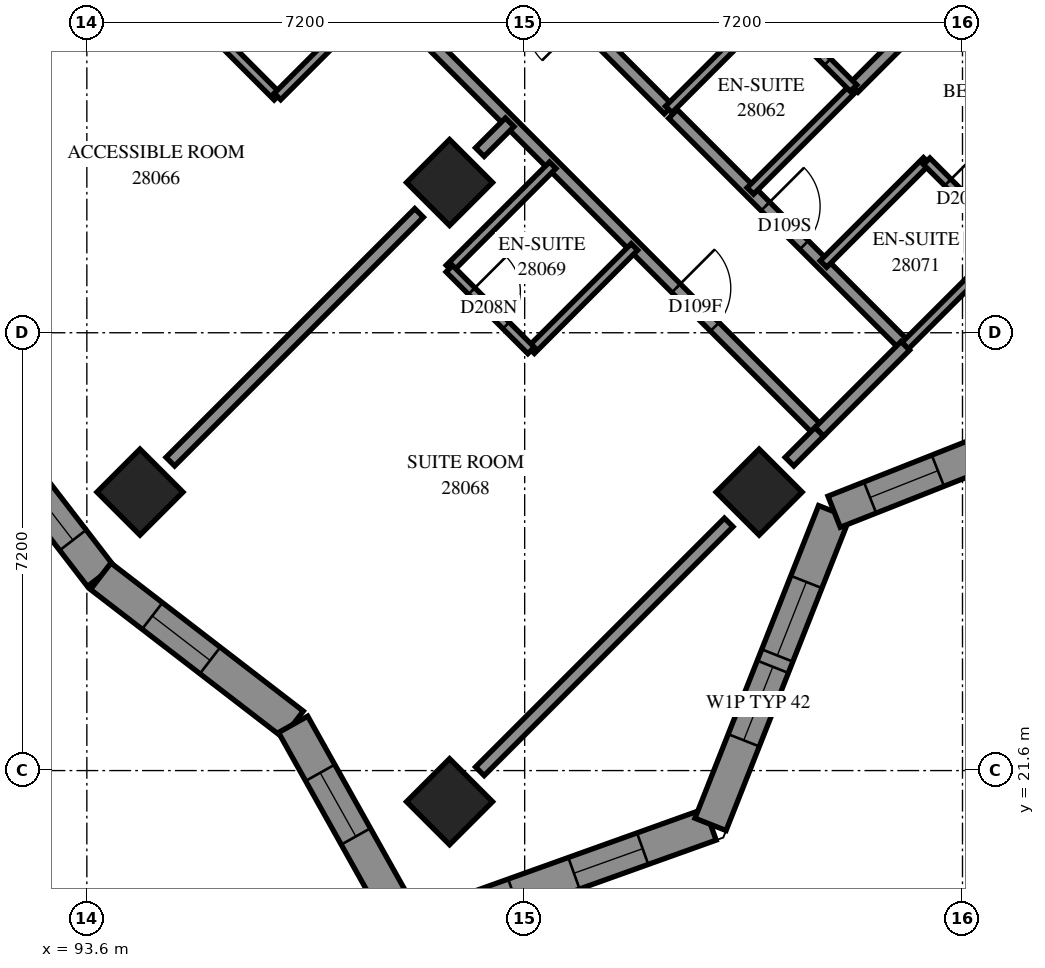
"""IFC4 building model, lengths in metres.
Left out: names, types, materials, properties, quantities, classifications, styles, units other than length and angle.
Written with IfcOpenShell. Run it as: python <this file> out.ifc"""

import sys

from ifc_helpers import new_model, si_unit, direction, frame, frame_2d, origin, origin_2d, place, context, subcontext, project, spatial, polyline, rectangle, outline, extrude, element, fill, save


model = new_model("IFC4")
c1 = context("Model", 3, precision=1e-05, world=origin(), true_north=direction((0.0, 1.0)))
c2 = subcontext(c1, "Body", "Model", "MODEL_VIEW")
j1 = project(units=[si_unit("LENGTHUNIT", "METRE"), si_unit("PLANEANGLEUNIT", "RADIAN")], contexts=[c1])
p1 = place(None, origin())
s1 = spatial("IfcSite", under=j1, at=p1, CompositionType="ELEMENT")
p2 = place(p1, origin())
s2 = spatial("IfcBuilding", under=s1, at=p2, CompositionType="ELEMENT")
p3 = place(p2, frame((0.0, 0.0, 105.0)))
s3 = spatial("IfcBuildingStorey", under=s2, at=p3, CompositionType="ELEMENT", Elevation=105.0)
for number, where, z_axis, x_axis in (
    (1, (99.565, 31.271, 0.0), (0.0, 0.0, 1.0), (0.707, -0.707, 0.0)),
    (2, (94.474, 26.18, 0.0), (0.0, 0.0, 1.0), (0.707, -0.707, 0.0)),
    (3, (104.656, 26.18, 0.0), (0.0, 0.0, 1.0), (0.707, -0.707, 0.0)),
    (4, (99.565, 21.088, 0.0), (0.0, 0.0, 1.0), (0.707, -0.707, 0.0)),
):
    element("IfcColumn", number, at=place(p3, frame(where, z_axis=z_axis, x_axis=x_axis)), inside=s3, PredefinedType="COLUMN", context=c2, shape_type="SweptSolid", body=[
        extrude(rectangle(XDim=1.0, YDim=1.0, at=origin_2d()), origin(), (0.0, 0.0, 1.0), 3.1),
    ])
p4 = place(p3, frame((98.905, 18.942, 0.0), z_axis=(0.0, 0.0, 1.0), x_axis=(0.941452059, 0.337146883, 0.0)))
e5 = element("IfcWall", 5, at=p4, inside=s3, PredefinedType="SOLIDWALL", context=c2, shape_type="SweptSolid", body=[
    extrude(outline(polyline([(-0.233, -0.275), (5.384, -0.275), (5.135, 0.275), (0.233, 0.275), (-0.233, -0.275)])), origin(), (0.0, 0.0, 1.0), 3.1),
])
p5 = place(p4, frame((0.623, 0.0, 0.5)))
e6 = element("IfcOpeningElement", 6, at=p5, cuts=e5, PredefinedType="OPENING", context=c2, shape_type="SweptSolid", body=[
    extrude(rectangle(XDim=1.2, YDim=2.45, at=frame_2d((0.6, 1.225))), frame((0.0, 0.285, 0.0), z_axis=(0.0, -1.0, 0.0), x_axis=(1.0, 0.0, 0.0)), (0.0, 0.0, 1.0), 0.57),
])
p6 = place(p4, frame((2.874, 0.0, 0.5)))
e7 = element("IfcOpeningElement", 7, at=p6, cuts=e5, PredefinedType="OPENING", context=c2, shape_type="SweptSolid", body=[
    extrude(rectangle(XDim=1.2, YDim=2.45, at=frame_2d((0.6, 1.225))), frame((0.0, 0.285, 0.0), z_axis=(0.0, -1.0, 0.0), x_axis=(1.0, 0.0, 0.0)), (0.0, 0.0, 1.0), 0.57),
])
p7 = place(p3, frame((103.856, 20.715, 0.0), z_axis=(0.0, 0.0, 1.0), x_axis=(0.3677360094, 0.9299302272, 0.0)))
e8 = element("IfcWall", 8, at=p7, inside=s3, PredefinedType="SOLIDWALL", context=c2, shape_type="SweptSolid", body=[
    extrude(outline(polyline([(-0.124, -0.275), (5.41, -0.275), (5.648, 0.275), (0.124, 0.275), (-0.124, -0.275)])), origin(), (0.0, 0.0, 1.0), 3.1),
])
p8 = place(p7, frame((1.487, 0.0, 0.5)))
e9 = element("IfcOpeningElement", 9, at=p8, cuts=e8, PredefinedType="OPENING", context=c2, shape_type="SweptSolid", body=[
    extrude(rectangle(XDim=1.3, YDim=2.45, at=frame_2d((0.65, 1.225))), frame((0.0, 0.285, 0.0), z_axis=(0.0, -1.0, 0.0), x_axis=(1.0, 0.0, 0.0)), (0.0, 0.0, 1.0), 0.57),
])
p9 = place(p7, frame((2.987, 0.0, 0.5)))
e10 = element("IfcOpeningElement", 10, at=p9, cuts=e8, PredefinedType="OPENING", context=c2, shape_type="SweptSolid", body=[
    extrude(rectangle(XDim=1.3, YDim=2.45, at=frame_2d((0.65, 1.225))), frame((0.0, 0.285, 0.0), z_axis=(0.0, -1.0, 0.0), x_axis=(1.0, 0.0, 0.0)), (0.0, 0.0, 1.0), 0.57),
])
p10 = place(p3, frame((105.889, 25.857, 0.0), z_axis=(0.0, 0.0, 1.0), x_axis=(0.9299302272, 0.3677360094, 0.0)))
e11 = element("IfcWall", 11, at=p10, inside=s3, PredefinedType="SOLIDWALL", context=c2, shape_type="SweptSolid", body=[
    extrude(outline(polyline([(0.119, -0.275), (5.653, -0.275), (5.404, 0.275), (-0.119, 0.275), (0.119, -0.275)])), origin(), (0.0, 0.0, 1.0), 3.1),
])
p11 = place(p10, frame((0.635, 0.0, 0.5)))
e12 = element("IfcOpeningElement", 12, at=p11, cuts=e11, PredefinedType="OPENING", context=c2, shape_type="SweptSolid", body=[
    extrude(rectangle(XDim=1.2, YDim=2.45, at=frame_2d((0.6, 1.225))), frame((0.0, 0.285, 0.0), z_axis=(0.0, -1.0, 0.0), x_axis=(1.0, 0.0, 0.0)), (0.0, 0.0, 1.0), 0.57),
])
p12 = place(p10, frame((3.137, 0.0, 0.5)))
e13 = element("IfcOpeningElement", 13, at=p12, cuts=e11, PredefinedType="OPENING", context=c2, shape_type="SweptSolid", body=[
    extrude(rectangle(XDim=1.2, YDim=2.45, at=frame_2d((0.6, 1.225))), frame((0.0, 0.285, 0.0), z_axis=(0.0, -1.0, 0.0), x_axis=(1.0, 0.0, 0.0)), (0.0, 0.0, 1.0), 0.57),
])
p13 = place(p3, frame((91.405, 27.944, 0.0), z_axis=(0.0, 0.0, 1.0), x_axis=(0.6100781116, -0.7923412761, 0.0)))
e14 = element("IfcWall", 14, at=p13, inside=s3, PredefinedType="SOLIDWALL", context=c2, shape_type="SweptSolid", body=[
    extrude(outline(polyline([(0.036, -0.275), (4.008, -0.275), (3.937, 0.275), (-0.036, 0.275), (0.036, -0.275)])), origin(), (0.0, 0.0, 1.0), 3.1),
])
p14 = place(p13, frame((0.423, 0.0, 0.5)))
e15 = element("IfcOpeningElement", 15, at=p14, cuts=e14, PredefinedType="OPENING", context=c2, shape_type="SweptSolid", body=[
    extrude(rectangle(XDim=1.3, YDim=2.45, at=frame_2d((0.65, 1.225))), frame((0.0, 0.285, 0.0), z_axis=(0.0, -1.0, 0.0), x_axis=(1.0, 0.0, 0.0)), (0.0, 0.0, 1.0), 0.57),
])
p15 = place(p13, frame((1.923, 0.0, 0.5)))
e16 = element("IfcOpeningElement", 16, at=p15, cuts=e14, PredefinedType="OPENING", context=c2, shape_type="SweptSolid", body=[
    extrude(rectangle(XDim=1.3, YDim=2.45, at=frame_2d((0.65, 1.225))), frame((0.0, 0.285, 0.0), z_axis=(0.0, -1.0, 0.0), x_axis=(1.0, 0.0, 0.0)), (0.0, 0.0, 1.0), 0.57),
])
p16 = place(p3, frame((93.828, 24.796, 0.0), z_axis=(0.0, 0.0, 1.0), x_axis=(0.7923473889, -0.6100701725, 0.0)))
e17 = element("IfcWall", 17, at=p16, inside=s3, PredefinedType="SOLIDWALL", context=c2, shape_type="SweptSolid", body=[
    extrude(outline(polyline([(-0.036, -0.275), (3.937, -0.275), (4.049, 0.275), (0.036, 0.275), (-0.036, -0.275)])), origin(), (0.0, 0.0, 1.0), 3.1),
])
p17 = place(p16, frame((1.07, 0.0, 0.5)))
e18 = element("IfcOpeningElement", 18, at=p17, cuts=e17, PredefinedType="OPENING", context=c2, shape_type="SweptSolid", body=[
    extrude(rectangle(XDim=1.2, YDim=2.45, at=frame_2d((0.6, 1.225))), frame((0.0, 0.285, 0.0), z_axis=(0.0, -1.0, 0.0), x_axis=(1.0, 0.0, 0.0)), (0.0, 0.0, 1.0), 0.57),
])
p18 = place(p3, frame((96.992, 22.36, 0.0), z_axis=(0.0, 0.0, 1.0), x_axis=(0.4884043341, -0.8726174456, 0.0)))
e19 = element("IfcWall", 19, at=p18, inside=s3, PredefinedType="SOLIDWALL", context=c2, shape_type="SweptSolid", body=[
    extrude(outline(polyline([(0.056, -0.275), (4.149, -0.275), (3.684, 0.275), (-0.056, 0.275), (0.056, -0.275)])), origin(), (0.0, 0.0, 1.0), 3.1),
])
p19 = place(p18, frame((0.912, 0.0, 0.5)))
e20 = element("IfcOpeningElement", 20, at=p19, cuts=e19, PredefinedType="OPENING", context=c2, shape_type="SweptSolid", body=[
    extrude(rectangle(XDim=1.2, YDim=2.45, at=frame_2d((0.6, 1.225))), frame((0.0, 0.285, 0.0), z_axis=(0.0, -1.0, 0.0), x_axis=(1.0, 0.0, 0.0)), (0.0, 0.0, 1.0), 0.57),
])
p20 = place(p3, frame((92.004, 40.819, 0.0), z_axis=(0.0, 0.0, 1.0), x_axis=(0.7071067812, -0.7071067812, 0.0)))
e21 = element("IfcWall", 21, at=p20, inside=s3, PredefinedType="PARTITIONING", context=c2, shape_type="SweptSolid", body=[
    extrude(rectangle(XDim=19.298, YDim=0.2, at=frame_2d((9.649, 0.0))), origin(), (0.0, 0.0, 1.0), 3.1),
])
p21 = place(p20, frame((3.489, 0.0, 0.0)))
e22 = element("IfcOpeningElement", 22, at=p21, cuts=e21, PredefinedType="OPENING", context=c2, shape_type="SweptSolid", body=[
    extrude(rectangle(XDim=0.9, YDim=2.1, at=frame_2d((0.45, 1.05))), frame((0.0, 0.11, 0.0), z_axis=(0.0, -1.0, 0.0), x_axis=(1.0, 0.0, 0.0)), (0.0, 0.0, 1.0), 0.22),
])
p22 = place(p20, frame((9.319, 0.0, 0.0)))
e23 = element("IfcOpeningElement", 23, at=p22, cuts=e21, PredefinedType="OPENING", context=c2, shape_type="SweptSolid", body=[
    extrude(rectangle(XDim=0.9, YDim=2.1, at=frame_2d((0.45, 1.05))), frame((0.0, 0.11, 0.0), z_axis=(0.0, -1.0, 0.0), x_axis=(1.0, 0.0, 0.0)), (0.0, 0.0, 1.0), 0.22),
])
p23 = place(p20, frame((15.961, 0.0, 0.0)))
e24 = element("IfcOpeningElement", 24, at=p23, cuts=e21, PredefinedType="OPENING", context=c2, shape_type="SweptSolid", body=[
    extrude(rectangle(XDim=0.9, YDim=2.1, at=frame_2d((0.45, 1.05))), frame((0.0, 0.11, 0.0), z_axis=(0.0, -1.0, 0.0), x_axis=(1.0, 0.0, 0.0)), (0.0, 0.0, 1.0), 0.22),
])
p24 = place(p3, frame((89.881, 31.771, 0.0), z_axis=(0.0, 0.0, 1.0), x_axis=(0.7071067812, 0.7071067812, 0.0)))
e25 = element("IfcWall", 25, at=p24, inside=s3, PredefinedType="PARTITIONING", context=c2, shape_type="SweptSolid", body=[
    extrude(rectangle(XDim=5.787, YDim=0.2, at=frame_2d((2.893, 0.0))), origin(), (0.0, 0.0, 1.0), 3.1),
])
p25 = place(p3, frame((100.063, 21.589, 0.0), z_axis=(0.0, 0.0, 1.0), x_axis=(0.7071067812, 0.7071067812, 0.0)))
e26 = element("IfcWall", 26, at=p25, inside=s3, PredefinedType="PARTITIONING", context=c2, shape_type="SweptSolid", body=[
    extrude(rectangle(XDim=5.787, YDim=0.2, at=frame_2d((2.893, 0.0))), origin(), (0.0, 0.0, 1.0), 2.6),
])
p26 = place(p3, frame((94.973, 26.681, 0.0), z_axis=(0.0, 0.0, 1.0), x_axis=(0.7071067812, 0.7071067812, 0.0)))
e27 = element("IfcWall", 27, at=p26, inside=s3, PredefinedType="PARTITIONING", context=c2, shape_type="SweptSolid", body=[
    extrude(rectangle(XDim=5.784, YDim=0.2, at=frame_2d((2.892, 0.0))), origin(), (0.0, 0.0, 1.0), 3.1),
])
p27 = place(p3, frame((103.239, 32.399, 0.0), z_axis=(0.0, 0.0, 1.0), x_axis=(0.7071067812, -0.7071067812, 0.0)))
e28 = element("IfcWall", 28, at=p27, inside=s3, PredefinedType="PARTITIONING", context=c2, shape_type="SweptSolid", body=[
    extrude(rectangle(XDim=5.399, YDim=0.2, at=frame_2d((2.7, 0.0))), origin(), (0.0, 0.0, 1.0), 3.1),
])
p28 = place(p27, frame((2.15, 0.0, 0.0)))
e29 = element("IfcOpeningElement", 29, at=p28, cuts=e28, PredefinedType="OPENING", context=c2, shape_type="SweptSolid", body=[
    extrude(rectangle(XDim=0.9, YDim=2.1, at=frame_2d((0.45, 1.05))), frame((0.0, 0.11, 0.0), z_axis=(0.0, -1.0, 0.0), x_axis=(1.0, 0.0, 0.0)), (0.0, 0.0, 1.0), 0.22),
])
p29 = place(p3, frame((103.168, 32.47, 0.0), z_axis=(0.0, 0.0, 1.0), x_axis=(-0.7067858967, 0.7074275201, 0.0)))
e30 = element("IfcWall", 30, at=p29, inside=s3, PredefinedType="PARTITIONING", context=c2, shape_type="SweptSolid", body=[
    extrude(rectangle(XDim=5.299, YDim=0.2, at=frame_2d((2.65, 0.0))), origin(), (0.0, 0.0, 1.0), 3.1),
])
p30 = place(p29, frame((2.043, 0.0, 0.0)))
e31 = element("IfcOpeningElement", 31, at=p30, cuts=e30, PredefinedType="OPENING", context=c2, shape_type="SweptSolid", body=[
    extrude(rectangle(XDim=0.9, YDim=2.1, at=frame_2d((0.45, 1.05))), frame((0.0, 0.11, 0.0), z_axis=(0.0, -1.0, 0.0), x_axis=(1.0, 0.0, 0.0)), (0.0, 0.0, 1.0), 0.22),
])
p31 = place(p3, frame((106.211, 32.827, 0.0), z_axis=(0.0, 0.0, 1.0), x_axis=(0.7071067812, 0.7071067812, 0.0)))
e32 = element("IfcWall", 32, at=p31, inside=s3, PredefinedType="PARTITIONING", context=c2, shape_type="SweptSolid", body=[
    extrude(rectangle(XDim=4.45, YDim=0.2, at=frame_2d((2.225, 0.0))), origin(), (0.0, 0.0, 1.0), 3.1),
])
p32 = place(p3, frame((94.471, 34.945, 0.0), z_axis=(0.0, 0.0, 1.0), x_axis=(0.7067942478, -0.7074191764, 0.0)))
e33 = element("IfcWall", 33, at=p32, inside=s3, PredefinedType="PARTITIONING", context=c2, shape_type="SweptSolid", body=[
    extrude(rectangle(XDim=3.2, YDim=0.15, at=frame_2d((1.6, 0.0))), origin(), (0.0, 0.0, 1.0), 3.1),
])
p33 = place(p32, frame((1.206, 0.0, 0.0)))
e34 = element("IfcOpeningElement", 34, at=p33, cuts=e33, PredefinedType="OPENING", context=c2, shape_type="SweptSolid", body=[
    extrude(rectangle(XDim=0.8, YDim=2.1, at=frame_2d((0.4, 1.05))), frame((0.0, 0.085, 0.0), z_axis=(0.0, -1.0, 0.0), x_axis=(1.0, 0.0, 0.0)), (0.0, 0.0, 1.0), 0.17),
])
for number, where, z_axis, x_axis in (
    (35, (96.735, 32.685, 0.0), (0.0, 0.0, 1.0), (0.707, 0.707, 0.0)),
    (36, (103.169, 32.473, 0.0), (0.0, 0.0, 1.0), (0.707, 0.707, 0.0)),
    (37, (99.563, 29.857, 0.0), (0.0, 0.0, 1.0), (0.707, 0.707, 0.0)),
    (38, (100.907, 28.513, 0.0), (0.0, 0.0, 1.0), (0.707, 0.707, 0.0)),
):
    element("IfcWall", number, at=place(p3, frame(where, z_axis=z_axis, x_axis=x_axis)), inside=s3, PredefinedType="PARTITIONING", context=c2, shape_type="SweptSolid", body=[
        extrude(rectangle(XDim=2.401, YDim=0.15, at=frame_2d((1.201, 0.0))), origin(), (0.0, 0.0, 1.0), 3.1),
    ])
for number, where, z_axis, x_axis in (
    (39, (104.511, 31.133, 0.0), (0.0, 0.0, 1.0), (0.708, 0.707, 0.0)),
    (40, (105.713, 29.931, 0.0), (0.0, 0.0, 1.0), (0.708, 0.707, 0.0)),
):
    element("IfcWall", number, at=place(p3, frame(where, z_axis=z_axis, x_axis=x_axis)), inside=s3, PredefinedType="PARTITIONING", context=c2, shape_type="SweptSolid", body=[
        extrude(rectangle(XDim=2.4, YDim=0.15, at=frame_2d((1.2, 0.0))), origin(), (0.0, 0.0, 1.0), 3.1),
    ])
p34 = place(p3, frame((107.057, 28.587, 0.0), z_axis=(0.0, 0.0, 1.0), x_axis=(0.7075233388, 0.706689978, 0.0)))
e41 = element("IfcWall", 41, at=p34, inside=s3, PredefinedType="PARTITIONING", context=c2, shape_type="SweptSolid", body=[
    extrude(rectangle(XDim=2.4, YDim=0.15, at=frame_2d((1.2, 0.0))), origin(), (0.0, 0.0, 1.0), 2.6),
])
p35 = place(p3, frame((105.645, 27.171, 0.0), z_axis=(0.0, 0.0, 1.0), x_axis=(0.7071067812, 0.7071067812, 0.0)))
e42 = element("IfcWall", 42, at=p35, inside=s3, PredefinedType="PARTITIONING", context=c2, shape_type="SweptSolid", body=[
    extrude(rectangle(XDim=2.0, YDim=0.2, at=frame_2d((1.0, 0.0))), origin(), (0.0, 0.0, 1.0), 2.6),
])
p36 = place(p3, frame((99.561, 29.853, 0.0), z_axis=(0.0, 0.0, 1.0), x_axis=(0.7071067812, -0.7071067812, 0.0)))
e43 = element("IfcWall", 43, at=p36, inside=s3, PredefinedType="PARTITIONING", context=c2, shape_type="SweptSolid", body=[
    extrude(rectangle(XDim=1.901, YDim=0.15, at=frame_2d((0.95, 0.0))), origin(), (0.0, 0.0, 1.0), 3.1),
])
p37 = place(p36, frame((0.519, 0.0, 0.0)))
e44 = element("IfcOpeningElement", 44, at=p37, cuts=e43, PredefinedType="OPENING", context=c2, shape_type="SweptSolid", body=[
    extrude(rectangle(XDim=0.8, YDim=2.1, at=frame_2d((0.4, 1.05))), frame((0.0, 0.085, 0.0), z_axis=(0.0, -1.0, 0.0), x_axis=(1.0, 0.0, 0.0)), (0.0, 0.0, 1.0), 0.17),
])
p38 = place(p3, frame((107.411, 31.621, 0.0), z_axis=(0.0, 0.0, 1.0), x_axis=(0.7071067812, -0.7071067812, 0.0)))
e45 = element("IfcWall", 45, at=p38, inside=s3, PredefinedType="PARTITIONING", context=c2, shape_type="SweptSolid", body=[
    extrude(rectangle(XDim=1.901, YDim=0.15, at=frame_2d((0.95, 0.0))), origin(), (0.0, 0.0, 1.0), 3.1),
])
p39 = place(p38, frame((0.493, 0.0, 0.0)))
e46 = element("IfcOpeningElement", 46, at=p39, cuts=e45, PredefinedType="OPENING", context=c2, shape_type="SweptSolid", body=[
    extrude(rectangle(XDim=0.8, YDim=2.1, at=frame_2d((0.4, 1.05))), frame((0.0, 0.085, 0.0), z_axis=(0.0, -1.0, 0.0), x_axis=(1.0, 0.0, 0.0)), (0.0, 0.0, 1.0), 0.17),
])
p40 = place(p3, frame((104.865, 34.167, 0.0), z_axis=(0.0, 0.0, 1.0), x_axis=(0.7071067812, -0.7071067812, 0.0)))
e47 = element("IfcWall", 47, at=p40, inside=s3, PredefinedType="PARTITIONING", context=c2, shape_type="SweptSolid", body=[
    extrude(rectangle(XDim=1.901, YDim=0.15, at=frame_2d((0.95, 0.0))), origin(), (0.0, 0.0, 1.0), 3.1),
])
p41 = place(p40, frame((0.493, 0.0, 0.0)))
e48 = element("IfcOpeningElement", 48, at=p41, cuts=e47, PredefinedType="OPENING", context=c2, shape_type="SweptSolid", body=[
    extrude(rectangle(XDim=0.8, YDim=2.1, at=frame_2d((0.4, 1.05))), frame((0.0, 0.085, 0.0), z_axis=(0.0, -1.0, 0.0), x_axis=(1.0, 0.0, 0.0)), (0.0, 0.0, 1.0), 0.17),
])
p42 = place(p3, frame((105.155, 26.681, 0.0), z_axis=(0.0, 0.0, 1.0), x_axis=(0.7071067812, 0.7071067812, 0.0)))
e49 = element("IfcWall", 49, at=p42, inside=s3, PredefinedType="PARTITIONING", context=c2, shape_type="SweptSolid", body=[
    extrude(rectangle(XDim=0.693, YDim=0.2, at=frame_2d((0.346, 0.0))), origin(), (0.0, 0.0, 1.0), 2.6),
])
p43 = place(p3, frame((100.063, 31.771, 0.0), z_axis=(0.0, 0.0, 1.0), x_axis=(0.7071067812, 0.7071067812, 0.0)))
e50 = element("IfcWall", 50, at=p43, inside=s3, PredefinedType="PARTITIONING", context=c2, shape_type="SweptSolid", body=[
    extrude(rectangle(XDim=0.693, YDim=0.2, at=frame_2d((0.346, 0.0))), origin(), (0.0, 0.0, 1.0), 3.1),
])
p44 = place(p5, origin())
e51 = element("IfcWindow", 51, at=p44, inside=s3, PartitioningType="SINGLE_PANEL", PredefinedType="WINDOW", context=c2, shape_type="SweptSolid", body=[
    extrude(rectangle(XDim=1.2, YDim=2.45, at=frame_2d((0.6, 1.225))), frame((0.0, 0.155, 0.0), z_axis=(0.0, -1.0, 0.0), x_axis=(1.0, 0.0, 0.0)), (0.0, 0.0, 1.0), 0.06),
])
fill(e6, e51)
p45 = place(p6, origin())
e52 = element("IfcWindow", 52, at=p45, inside=s3, PartitioningType="SINGLE_PANEL", PredefinedType="WINDOW", context=c2, shape_type="SweptSolid", body=[
    extrude(rectangle(XDim=1.2, YDim=2.45, at=frame_2d((0.6, 1.225))), frame((0.0, 0.155, 0.0), z_axis=(0.0, -1.0, 0.0), x_axis=(1.0, 0.0, 0.0)), (0.0, 0.0, 1.0), 0.06),
])
fill(e7, e52)
p46 = place(p8, origin())
e53 = element("IfcWindow", 53, at=p46, inside=s3, PartitioningType="SINGLE_PANEL", PredefinedType="WINDOW", context=c2, shape_type="SweptSolid", body=[
    extrude(rectangle(XDim=1.3, YDim=2.45, at=frame_2d((0.65, 1.225))), frame((0.0, 0.155, 0.0), z_axis=(0.0, -1.0, 0.0), x_axis=(1.0, 0.0, 0.0)), (0.0, 0.0, 1.0), 0.06),
])
fill(e9, e53)
p47 = place(p9, origin())
e54 = element("IfcWindow", 54, at=p47, inside=s3, PartitioningType="SINGLE_PANEL", PredefinedType="WINDOW", context=c2, shape_type="SweptSolid", body=[
    extrude(rectangle(XDim=1.3, YDim=2.45, at=frame_2d((0.65, 1.225))), frame((0.0, 0.155, 0.0), z_axis=(0.0, -1.0, 0.0), x_axis=(1.0, 0.0, 0.0)), (0.0, 0.0, 1.0), 0.06),
])
fill(e10, e54)
p48 = place(p11, origin())
e55 = element("IfcWindow", 55, at=p48, inside=s3, PartitioningType="SINGLE_PANEL", PredefinedType="WINDOW", context=c2, shape_type="SweptSolid", body=[
    extrude(rectangle(XDim=1.2, YDim=2.45, at=frame_2d((0.6, 1.225))), frame((0.0, 0.155, 0.0), z_axis=(0.0, -1.0, 0.0), x_axis=(1.0, 0.0, 0.0)), (0.0, 0.0, 1.0), 0.06),
])
fill(e12, e55)
p49 = place(p15, origin())
e56 = element("IfcWindow", 56, at=p49, inside=s3, PartitioningType="SINGLE_PANEL", PredefinedType="WINDOW", context=c2, shape_type="SweptSolid", body=[
    extrude(rectangle(XDim=1.3, YDim=2.45, at=frame_2d((0.65, 1.225))), frame((0.0, 0.155, 0.0), z_axis=(0.0, -1.0, 0.0), x_axis=(1.0, 0.0, 0.0)), (0.0, 0.0, 1.0), 0.06),
])
fill(e16, e56)
p50 = place(p17, origin())
e57 = element("IfcWindow", 57, at=p50, inside=s3, PartitioningType="SINGLE_PANEL", PredefinedType="WINDOW", context=c2, shape_type="SweptSolid", body=[
    extrude(rectangle(XDim=1.2, YDim=2.45, at=frame_2d((0.6, 1.225))), frame((0.0, 0.155, 0.0), z_axis=(0.0, -1.0, 0.0), x_axis=(1.0, 0.0, 0.0)), (0.0, 0.0, 1.0), 0.06),
])
fill(e18, e57)
p51 = place(p19, origin())
e58 = element("IfcWindow", 58, at=p51, inside=s3, PartitioningType="SINGLE_PANEL", PredefinedType="WINDOW", context=c2, shape_type="SweptSolid", body=[
    extrude(rectangle(XDim=1.2, YDim=2.45, at=frame_2d((0.6, 1.225))), frame((0.0, 0.155, 0.0), z_axis=(0.0, -1.0, 0.0), x_axis=(1.0, 0.0, 0.0)), (0.0, 0.0, 1.0), 0.06),
])
fill(e20, e58)
p52 = place(p41, origin())
e59 = element("IfcDoor", 59, at=p52, inside=s3, OperationType="SINGLE_SWING_RIGHT", PredefinedType="DOOR", context=c2, shape_type="SweptSolid", body=[
    extrude(rectangle(XDim=0.8, YDim=2.1, at=frame_2d((0.4, 1.05))), frame((0.0, 0.025, 0.0), z_axis=(0.0, -1.0, 0.0), x_axis=(1.0, 0.0, 0.0)), (0.0, 0.0, 1.0), 0.05),
])
fill(e48, e59)
p53 = place(p23, origin())
e60 = element("IfcDoor", 60, at=p53, inside=s3, OperationType="SINGLE_SWING_RIGHT", PredefinedType="DOOR", context=c2, shape_type="SweptSolid", body=[
    extrude(rectangle(XDim=0.9, YDim=2.1, at=frame_2d((0.45, 1.05))), frame((0.0, 0.025, 0.0), z_axis=(0.0, -1.0, 0.0), x_axis=(1.0, 0.0, 0.0)), (0.0, 0.0, 1.0), 0.05),
])
fill(e24, e60)
p54 = place(p37, origin())
e61 = element("IfcDoor", 61, at=p54, inside=s3, OperationType="SINGLE_SWING_RIGHT", PredefinedType="DOOR", context=c2, shape_type="SweptSolid", body=[
    extrude(rectangle(XDim=0.8, YDim=2.1, at=frame_2d((0.4, 1.05))), frame((0.0, 0.025, 0.0), z_axis=(0.0, -1.0, 0.0), x_axis=(1.0, 0.0, 0.0)), (0.0, 0.0, 1.0), 0.05),
])
fill(e44, e61)
p55 = place(p28, origin())
e62 = element("IfcDoor", 62, at=p55, inside=s3, OperationType="SINGLE_SWING_RIGHT", PredefinedType="DOOR", context=c2, shape_type="SweptSolid", body=[
    extrude(rectangle(XDim=0.9, YDim=2.1, at=frame_2d((0.45, 1.05))), frame((0.0, 0.025, 0.0), z_axis=(0.0, -1.0, 0.0), x_axis=(1.0, 0.0, 0.0)), (0.0, 0.0, 1.0), 0.05),
])
fill(e29, e62)
p56 = place(p39, origin())
e63 = element("IfcDoor", 63, at=p56, inside=s3, OperationType="SINGLE_SWING_RIGHT", PredefinedType="DOOR", context=c2, shape_type="SweptSolid", body=[
    extrude(rectangle(XDim=0.8, YDim=2.1, at=frame_2d((0.4, 1.05))), frame((0.0, 0.025, 0.0), z_axis=(0.0, -1.0, 0.0), x_axis=(1.0, 0.0, 0.0)), (0.0, 0.0, 1.0), 0.05),
])
fill(e46, e63)
save(model, sys.argv[1])
